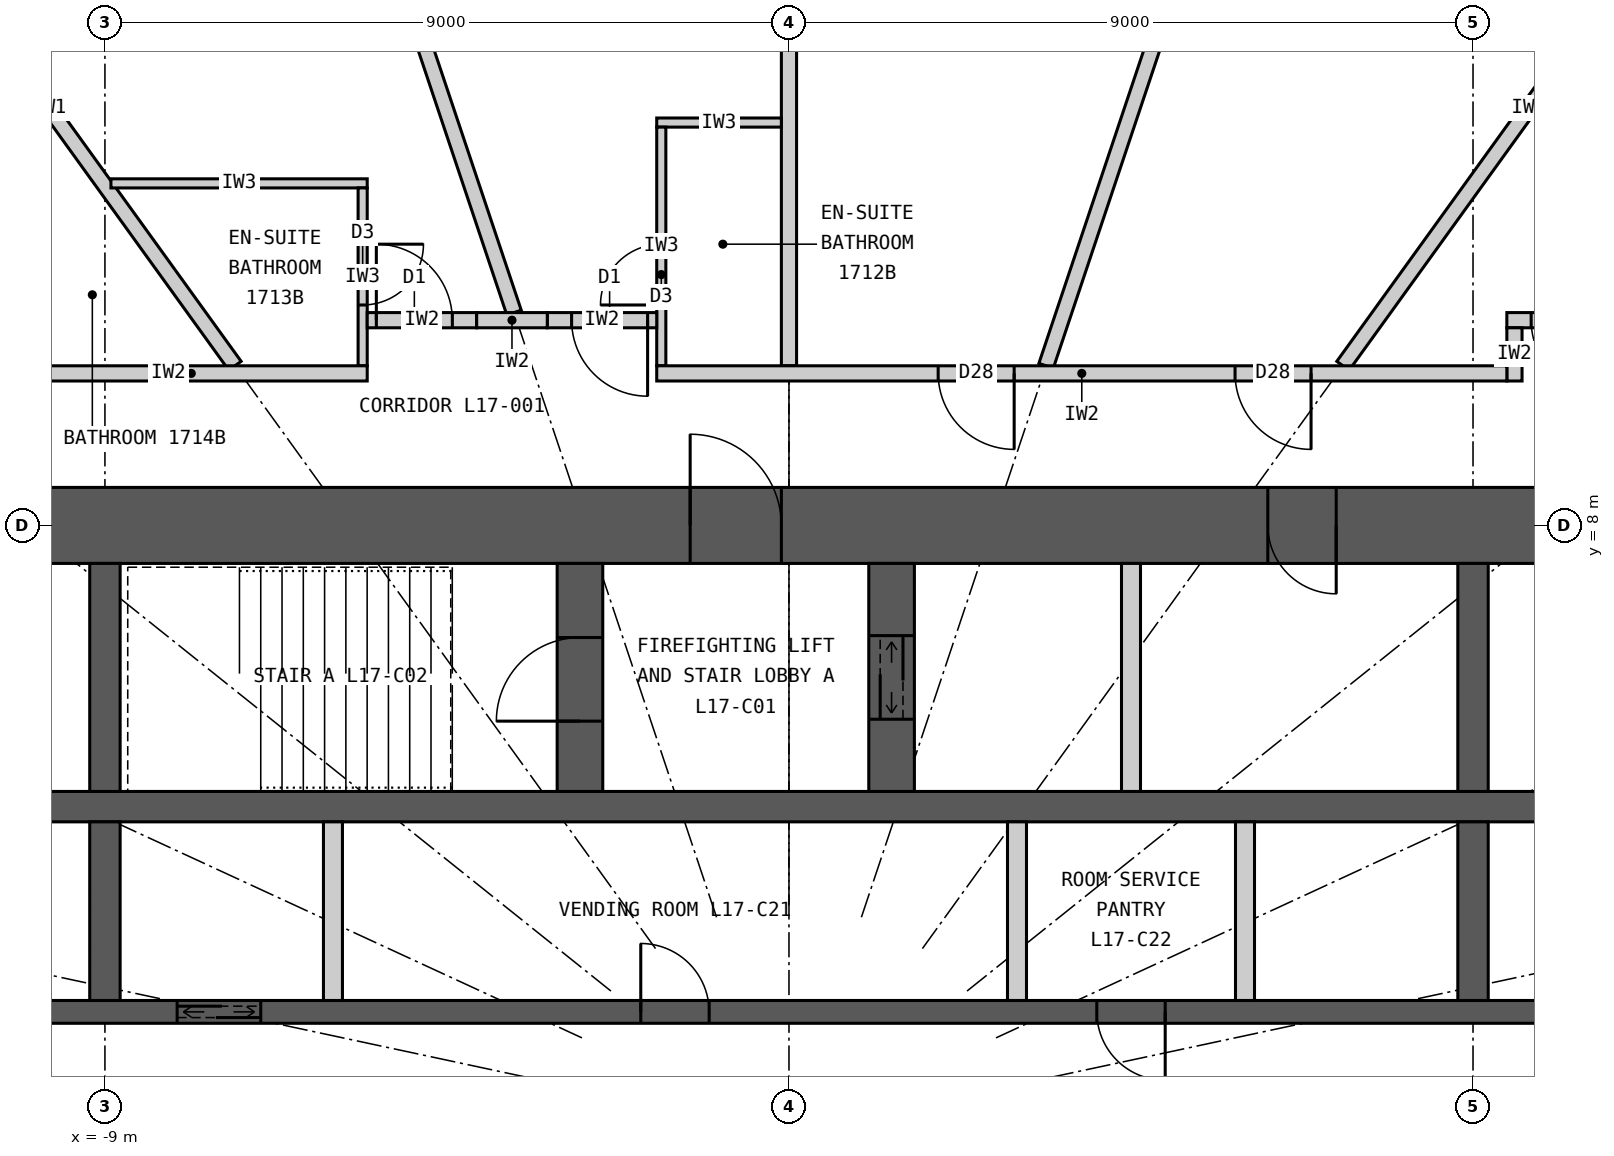
"""IFC4 building model, lengths in metres.
Left out: names, types, materials, properties, quantities, classifications, styles, units other than length and angle.
Written with IfcOpenShell. Run it as: python <this file> out.ifc"""

import sys

from ifc_helpers import new_model, si_unit, direction, frame, frame_2d, origin, place, context, subcontext, project, spatial, rectangle, extrude, element, fill, save


model = new_model("IFC4")
c1 = context("Model", 3, precision=1e-05, world=origin(), true_north=direction((0.0, 1.0)))
c2 = subcontext(c1, "Body", "Model", "MODEL_VIEW")
j1 = project(units=[si_unit("LENGTHUNIT", "METRE"), si_unit("PLANEANGLEUNIT", "RADIAN")], contexts=[c1])
p1 = place(None, origin())
s1 = spatial("IfcSite", under=j1, at=p1, CompositionType="ELEMENT")
p2 = place(p1, origin())
s2 = spatial("IfcBuilding", under=s1, at=p2, CompositionType="ELEMENT")
p3 = place(p2, frame((0.0, 0.0, 70.5)))
s3 = spatial("IfcBuildingStorey", under=s2, at=p3, CompositionType="ELEMENT", Elevation=70.5)
p4 = place(p3, frame((-12.5, 8.0, 0.0), z_axis=(0.0, 0.0, 1.0), x_axis=(1.0, 0.0, 0.0)))
e1 = element("IfcWall", 1, at=p4, inside=s3, PredefinedType="SHEAR", context=c2, shape_type="SweptSolid", body=[
    extrude(rectangle(XDim=25.0, YDim=1.0, at=frame_2d((12.5, 0.0))), origin(), (0.0, 0.0, 1.0), 3.3),
])
p5 = place(p4, frame((11.2, 0.0, 0.0)))
e2 = element("IfcOpeningElement", 2, at=p5, cuts=e1, PredefinedType="OPENING", context=c2, shape_type="SweptSolid", body=[
    extrude(rectangle(XDim=1.2, YDim=2.2, at=frame_2d((0.6, 1.1))), frame((0.0, 0.51, 0.0), z_axis=(0.0, -1.0, 0.0), x_axis=(1.0, 0.0, 0.0)), (0.0, 0.0, 1.0), 1.02),
])
p6 = place(p4, frame((18.8, 0.0, 0.0)))
e3 = element("IfcOpeningElement", 3, at=p6, cuts=e1, PredefinedType="OPENING", context=c2, shape_type="SweptSolid", body=[
    extrude(rectangle(XDim=0.9, YDim=2.2, at=frame_2d((0.45, 1.1))), frame((0.0, 0.51, 0.0), z_axis=(0.0, -1.0, 0.0), x_axis=(1.0, 0.0, 0.0)), (0.0, 0.0, 1.0), 1.02),
])
p7 = place(p3, frame((-11.5, 4.3, 0.0), z_axis=(0.0, 0.0, 1.0), x_axis=(1.0, 0.0, 0.0)))
e4 = element("IfcWall", 4, at=p7, inside=s3, PredefinedType="SHEAR", context=c2, shape_type="SweptSolid", body=[
    extrude(rectangle(XDim=23.0, YDim=0.4, at=frame_2d((11.5, 0.0))), origin(), (0.0, 0.0, 1.0), 3.3),
])
p8 = place(p3, frame((-11.5, 1.6, 0.0), z_axis=(0.0, 0.0, 1.0), x_axis=(1.0, 0.0, 0.0)))
e5 = element("IfcWall", 5, at=p8, inside=s3, PredefinedType="SHEAR", context=c2, shape_type="SweptSolid", body=[
    extrude(rectangle(XDim=23.0, YDim=0.3, at=frame_2d((11.5, 0.0))), origin(), (0.0, 0.0, 1.0), 3.3),
])
p9 = place(p8, frame((0.45, 0.0, 0.0)))
e6 = element("IfcOpeningElement", 6, at=p9, cuts=e5, PredefinedType="OPENING", context=c2, shape_type="SweptSolid", body=[
    extrude(rectangle(XDim=1.1, YDim=2.2, at=frame_2d((0.55, 1.1))), frame((0.0, 0.16, 0.0), z_axis=(0.0, -1.0, 0.0), x_axis=(1.0, 0.0, 0.0)), (0.0, 0.0, 1.0), 0.32),
])
p10 = place(p8, frame((3.45, 0.0, 0.0)))
e7 = element("IfcOpeningElement", 7, at=p10, cuts=e5, PredefinedType="OPENING", context=c2, shape_type="SweptSolid", body=[
    extrude(rectangle(XDim=1.1, YDim=2.2, at=frame_2d((0.55, 1.1))), frame((0.0, 0.16, 0.0), z_axis=(0.0, -1.0, 0.0), x_axis=(1.0, 0.0, 0.0)), (0.0, 0.0, 1.0), 0.32),
])
p11 = place(p8, frame((9.55, 0.0, 0.0)))
e8 = element("IfcOpeningElement", 8, at=p11, cuts=e5, PredefinedType="OPENING", context=c2, shape_type="SweptSolid", body=[
    extrude(rectangle(XDim=0.9, YDim=2.2, at=frame_2d((0.45, 1.1))), frame((0.0, 0.16, 0.0), z_axis=(0.0, -1.0, 0.0), x_axis=(1.0, 0.0, 0.0)), (0.0, 0.0, 1.0), 0.32),
])
p12 = place(p8, frame((15.55, 0.0, 0.0)))
e9 = element("IfcOpeningElement", 9, at=p12, cuts=e5, PredefinedType="OPENING", context=c2, shape_type="SweptSolid", body=[
    extrude(rectangle(XDim=0.9, YDim=2.2, at=frame_2d((0.45, 1.1))), frame((0.0, 0.16, 0.0), z_axis=(0.0, -1.0, 0.0), x_axis=(1.0, 0.0, 0.0)), (0.0, 0.0, 1.0), 0.32),
])
p13 = place(p3, frame((-9.0, 4.5, 0.0), z_axis=(0.0, 0.0, 1.0), x_axis=(0.0, 1.0, 0.0)))
e10 = element("IfcWall", 10, at=p13, inside=s3, PredefinedType="SHEAR", context=c2, shape_type="SweptSolid", body=[
    extrude(rectangle(XDim=3.0, YDim=0.4, at=frame_2d((1.5, 0.0))), origin(), (0.0, 0.0, 1.0), 3.3),
])
p14 = place(p3, frame((-9.0, 1.75, 0.0), z_axis=(0.0, 0.0, 1.0), x_axis=(0.0, 1.0, 0.0)))
e11 = element("IfcWall", 11, at=p14, inside=s3, PredefinedType="SHEAR", context=c2, shape_type="SweptSolid", body=[
    extrude(rectangle(XDim=2.35, YDim=0.4, at=frame_2d((1.175, 0.0))), origin(), (0.0, 0.0, 1.0), 3.3),
])
p15 = place(p3, frame((9.0, 4.5, 0.0), z_axis=(0.0, 0.0, 1.0), x_axis=(0.0, 1.0, 0.0)))
e12 = element("IfcWall", 12, at=p15, inside=s3, PredefinedType="SHEAR", context=c2, shape_type="SweptSolid", body=[
    extrude(rectangle(XDim=3.0, YDim=0.4, at=frame_2d((1.5, 0.0))), origin(), (0.0, 0.0, 1.0), 3.3),
])
p16 = place(p3, frame((9.0, 1.75, 0.0), z_axis=(0.0, 0.0, 1.0), x_axis=(0.0, 1.0, 0.0)))
e13 = element("IfcWall", 13, at=p16, inside=s3, PredefinedType="SHEAR", context=c2, shape_type="SweptSolid", body=[
    extrude(rectangle(XDim=2.35, YDim=0.4, at=frame_2d((1.175, 0.0))), origin(), (0.0, 0.0, 1.0), 3.3),
])
p17 = place(p3, frame((-2.75, 4.5, 0.0), z_axis=(0.0, 0.0, 1.0), x_axis=(0.0, 1.0, 0.0)))
e14 = element("IfcWall", 14, at=p17, inside=s3, PredefinedType="SHEAR", context=c2, shape_type="SweptSolid", body=[
    extrude(rectangle(XDim=3.0, YDim=0.6, at=frame_2d((1.5, 0.0))), origin(), (0.0, 0.0, 1.0), 3.3),
])
p18 = place(p17, frame((0.925, 0.0, 0.0)))
e15 = element("IfcOpeningElement", 15, at=p18, cuts=e14, PredefinedType="OPENING", context=c2, shape_type="SweptSolid", body=[
    extrude(rectangle(XDim=1.1, YDim=2.2, at=frame_2d((0.55, 1.1))), frame((0.0, 0.31, 0.0), z_axis=(0.0, -1.0, 0.0), x_axis=(1.0, 0.0, 0.0)), (0.0, 0.0, 1.0), 0.62),
])
p19 = place(p3, frame((1.35, 4.5, 0.0), z_axis=(0.0, 0.0, 1.0), x_axis=(0.0, 1.0, 0.0)))
e16 = element("IfcWall", 16, at=p19, inside=s3, PredefinedType="SHEAR", context=c2, shape_type="SweptSolid", body=[
    extrude(rectangle(XDim=3.0, YDim=0.6, at=frame_2d((1.5, 0.0))), origin(), (0.0, 0.0, 1.0), 3.3),
])
p20 = place(p19, frame((0.95, 0.0, 0.0)))
e17 = element("IfcOpeningElement", 17, at=p20, cuts=e16, PredefinedType="OPENING", context=c2, shape_type="SweptSolid", body=[
    extrude(rectangle(XDim=1.1, YDim=2.2, at=frame_2d((0.55, 1.1))), frame((0.0, 0.31, 0.0), z_axis=(0.0, -1.0, 0.0), x_axis=(1.0, 0.0, 0.0)), (0.0, 0.0, 1.0), 0.62),
])
p21 = place(p3, frame((4.5, 4.5, 0.0), z_axis=(0.0, 0.0, 1.0), x_axis=(0.0, 1.0, 0.0)))
e18 = element("IfcWall", 18, at=p21, inside=s3, PredefinedType="PARTITIONING", context=c2, shape_type="SweptSolid", body=[
    extrude(rectangle(XDim=3.0, YDim=0.25, at=frame_2d((1.5, 0.0))), origin(), (0.0, 0.0, 1.0), 3.3),
])
for number, where, z_axis, x_axis in (
    (19, (-6.0, 1.75, 0.0), (0.0, 0.0, 1.0), (0.0, 1.0, 0.0)),
    (20, (3.0, 1.75, 0.0), (0.0, 0.0, 1.0), (0.0, 1.0, 0.0)),
    (21, (6.0, 1.75, 0.0), (0.0, 0.0, 1.0), (0.0, 1.0, 0.0)),
):
    element("IfcWall", number, at=place(p3, frame(where, z_axis=z_axis, x_axis=x_axis)), inside=s3, PredefinedType="PARTITIONING", context=c2, shape_type="SweptSolid", body=[
        extrude(rectangle(XDim=2.35, YDim=0.25, at=frame_2d((1.175, 0.0))), origin(), (0.0, 0.0, 1.0), 3.3),
    ])
p22 = place(p3, frame((7.289, 10.1, 0.0), z_axis=(0.0, 0.0, 1.0), x_axis=(0.585198353053, 0.810890182197, 0.0)))
e22 = element("IfcWall", 22, at=p22, inside=s3, PredefinedType="PARTITIONING", context=c2, shape_type="SweptSolid", body=[
    extrude(rectangle(XDim=8.36, YDim=0.2, at=frame_2d((4.18, 0.0))), origin(), (0.0, 0.0, 1.0), 2.32),
])
p23 = place(p3, frame((3.383, 10.1, 0.0), z_axis=(0.0, 0.0, 1.0), x_axis=(0.31759592231, 0.948226149256, 0.0)))
e23 = element("IfcWall", 23, at=p23, inside=s3, PredefinedType="PARTITIONING", context=c2, shape_type="SweptSolid", body=[
    extrude(rectangle(XDim=9.098, YDim=0.2, at=frame_2d((4.549, 0.0))), origin(), (0.0, 0.0, 1.0), 2.32),
])
p24 = place(p3, frame((0.0, 10.1, 0.0), z_axis=(0.0, 0.0, 1.0), x_axis=(0.0, 1.0, 0.0)))
e24 = element("IfcWall", 24, at=p24, inside=s3, PredefinedType="PARTITIONING", context=c2, shape_type="SweptSolid", body=[
    extrude(rectangle(XDim=9.25, YDim=0.2, at=frame_2d((4.625, 0.0))), origin(), (0.0, 0.0, 1.0), 2.32),
])
p25 = place(p3, frame((-3.617, 10.8, 0.0), z_axis=(0.0, 0.0, 1.0), x_axis=(-0.317576599239, 0.948232621046, 0.0)))
e25 = element("IfcWall", 25, at=p25, inside=s3, PredefinedType="PARTITIONING", context=c2, shape_type="SweptSolid", body=[
    extrude(rectangle(XDim=8.36, YDim=0.2, at=frame_2d((4.18, 0.0))), origin(), (0.0, 0.0, 1.0), 2.32),
])
p26 = place(p3, frame((-7.289, 10.1, 0.0), z_axis=(0.0, 0.0, 1.0), x_axis=(-0.585198353053, 0.810890182197, 0.0)))
e26 = element("IfcWall", 26, at=p26, inside=s3, PredefinedType="PARTITIONING", context=c2, shape_type="SweptSolid", body=[
    extrude(rectangle(XDim=8.36, YDim=0.2, at=frame_2d((4.18, 0.0))), origin(), (0.0, 0.0, 1.0), 2.32),
])
p27 = place(p3, frame((-0.1, 13.3, 0.0), z_axis=(0.0, 0.0, 1.0), x_axis=(-1.0, 0.0, 0.0)))
e27 = element("IfcWall", 27, at=p27, inside=s3, PredefinedType="PARTITIONING", context=c2, shape_type="SweptSolid", body=[
    extrude(rectangle(XDim=1.64, YDim=0.12, at=frame_2d((0.82, 0.0))), origin(), (0.0, 0.0, 1.0), 3.12),
])
p28 = place(p3, frame((-1.68, 10.1, 0.0), z_axis=(0.0, 0.0, 1.0), x_axis=(0.0, 1.0, 0.0)))
e28 = element("IfcWall", 28, at=p28, inside=s3, PredefinedType="PARTITIONING", context=c2, shape_type="SweptSolid", body=[
    extrude(rectangle(XDim=3.14, YDim=0.12, at=frame_2d((1.57, 0.0))), origin(), (0.0, 0.0, 1.0), 3.12),
])
p29 = place(p28, frame((0.8, 0.0, 0.0)))
e29 = element("IfcOpeningElement", 29, at=p29, cuts=e28, PredefinedType="OPENING", context=c2, shape_type="SweptSolid", body=[
    extrude(rectangle(XDim=0.8, YDim=2.1, at=frame_2d((0.4, 1.05))), frame((0.0, 0.07, 0.0), z_axis=(0.0, -1.0, 0.0), x_axis=(1.0, 0.0, 0.0)), (0.0, 0.0, 1.0), 0.14),
])
p30 = place(p3, frame((-8.921, 12.5, 0.0), z_axis=(0.0, 0.0, 1.0), x_axis=(1.0, 0.0, 0.0)))
e30 = element("IfcWall", 30, at=p30, inside=s3, PredefinedType="PARTITIONING", context=c2, shape_type="SweptSolid", body=[
    extrude(rectangle(XDim=3.372, YDim=0.12, at=frame_2d((1.686, 0.0))), origin(), (0.0, 0.0, 1.0), 3.12),
])
p31 = place(p3, frame((-5.609, 10.1, 0.0), z_axis=(0.0, 0.0, 1.0), x_axis=(0.0, 1.0, 0.0)))
e31 = element("IfcWall", 31, at=p31, inside=s3, PredefinedType="PARTITIONING", context=c2, shape_type="SweptSolid", body=[
    extrude(rectangle(XDim=2.34, YDim=0.12, at=frame_2d((1.17, 0.0))), origin(), (0.0, 0.0, 1.0), 3.12),
])
p32 = place(p31, frame((0.8, 0.0, 0.0)))
e32 = element("IfcOpeningElement", 32, at=p32, cuts=e31, PredefinedType="OPENING", context=c2, shape_type="SweptSolid", body=[
    extrude(rectangle(XDim=0.8, YDim=2.1, at=frame_2d((0.4, 1.05))), frame((0.0, 0.07, 0.0), z_axis=(0.0, -1.0, 0.0), x_axis=(1.0, 0.0, 0.0)), (0.0, 0.0, 1.0), 0.14),
])
p33 = place(p3, frame((9.445, 10.7, 0.0), z_axis=(0.0, 0.0, 1.0), x_axis=(1.0, 0.0, 0.0)))
e33 = element("IfcWall", 33, at=p33, inside=s3, PredefinedType="PARTITIONING", context=c2, shape_type="SweptSolid", body=[
    extrude(rectangle(XDim=1.44, YDim=0.2, at=frame_2d((0.72, 0.0))), origin(), (0.0, 0.0, 1.0), 3.12),
])
p34 = place(p33, frame((0.32, 0.0, 0.0)))
e34 = element("IfcOpeningElement", 34, at=p34, cuts=e33, PredefinedType="OPENING", context=c2, shape_type="SweptSolid", body=[
    extrude(rectangle(XDim=1.0, YDim=2.2, at=frame_2d((0.5, 1.1))), frame((0.0, 0.11, 0.0), z_axis=(0.0, -1.0, 0.0), x_axis=(1.0, 0.0, 0.0)), (0.0, 0.0, 1.0), 0.22),
])
p35 = place(p3, frame((9.545, 9.9, 0.0), z_axis=(0.0, 0.0, 1.0), x_axis=(0.0, 1.0, 0.0)))
e35 = element("IfcWall", 35, at=p35, inside=s3, PredefinedType="PARTITIONING", context=c2, shape_type="SweptSolid", body=[
    extrude(rectangle(XDim=0.7, YDim=0.2, at=frame_2d((0.35, 0.0))), origin(), (0.0, 0.0, 1.0), 3.12),
])
p36 = place(p3, frame((-3.18, 10.7, 0.0), z_axis=(0.0, 0.0, 1.0), x_axis=(1.0, 0.0, 0.0)))
e36 = element("IfcWall", 36, at=p36, inside=s3, PredefinedType="PARTITIONING", context=c2, shape_type="SweptSolid", body=[
    extrude(rectangle(XDim=1.44, YDim=0.2, at=frame_2d((0.72, 0.0))), origin(), (0.0, 0.0, 1.0), 3.12),
])
p37 = place(p36, frame((0.32, 0.0, 0.0)))
e37 = element("IfcOpeningElement", 37, at=p37, cuts=e36, PredefinedType="OPENING", context=c2, shape_type="SweptSolid", body=[
    extrude(rectangle(XDim=1.0, YDim=2.2, at=frame_2d((0.5, 1.1))), frame((0.0, 0.11, 0.0), z_axis=(0.0, -1.0, 0.0), x_axis=(1.0, 0.0, 0.0)), (0.0, 0.0, 1.0), 0.22),
])
p38 = place(p3, frame((-5.549, 10.7, 0.0), z_axis=(0.0, 0.0, 1.0), x_axis=(1.0, 0.0, 0.0)))
e38 = element("IfcWall", 38, at=p38, inside=s3, PredefinedType="PARTITIONING", context=c2, shape_type="SweptSolid", body=[
    extrude(rectangle(XDim=1.44, YDim=0.2, at=frame_2d((0.72, 0.0))), origin(), (0.0, 0.0, 1.0), 3.12),
])
p39 = place(p38, frame((0.12, 0.0, 0.0)))
e39 = element("IfcOpeningElement", 39, at=p39, cuts=e38, PredefinedType="OPENING", context=c2, shape_type="SweptSolid", body=[
    extrude(rectangle(XDim=1.0, YDim=2.2, at=frame_2d((0.5, 1.1))), frame((0.0, 0.11, 0.0), z_axis=(0.0, -1.0, 0.0), x_axis=(1.0, 0.0, 0.0)), (0.0, 0.0, 1.0), 0.22),
])
p40 = place(p3, frame((-4.109, 10.7, 0.0), z_axis=(0.0, 0.0, 1.0), x_axis=(1.0, 0.0, 0.0)))
e40 = element("IfcWall", 40, at=p40, inside=s3, PredefinedType="PARTITIONING", context=c2, shape_type="SweptSolid", body=[
    extrude(rectangle(XDim=0.929, YDim=0.2, at=frame_2d((0.465, 0.0))), origin(), (0.0, 0.0, 1.0), 3.12),
])
p41 = place(p3, frame((-10.179, 10.0, 0.0), z_axis=(0.0, 0.0, 1.0), x_axis=(1.0, 0.0, 0.0)))
e41 = element("IfcWall", 41, at=p41, inside=s3, PredefinedType="PARTITIONING", context=c2, shape_type="SweptSolid", body=[
    extrude(rectangle(XDim=4.63, YDim=0.2, at=frame_2d((2.315, 0.0))), origin(), (0.0, 0.0, 1.0), 3.12),
])
p42 = place(p3, frame((-1.74, 10.0, 0.0), z_axis=(0.0, 0.0, 1.0), x_axis=(1.0, 0.0, 0.0)))
e42 = element("IfcWall", 42, at=p42, inside=s3, PredefinedType="PARTITIONING", context=c2, shape_type="SweptSolid", body=[
    extrude(rectangle(XDim=11.185, YDim=0.2, at=frame_2d((5.593, 0.0))), origin(), (0.0, 0.0, 1.0), 3.12),
])
p43 = place(p42, frame((7.609, 0.0, 0.0)))
e43 = element("IfcOpeningElement", 43, at=p43, cuts=e42, PredefinedType="OPENING", context=c2, shape_type="SweptSolid", body=[
    extrude(rectangle(XDim=1.0, YDim=2.2, at=frame_2d((0.5, 1.1))), frame((0.0, 0.11, 0.0), z_axis=(0.0, -1.0, 0.0), x_axis=(1.0, 0.0, 0.0)), (0.0, 0.0, 1.0), 0.22),
])
p44 = place(p42, frame((3.703, 0.0, 0.0)))
e44 = element("IfcOpeningElement", 44, at=p44, cuts=e42, PredefinedType="OPENING", context=c2, shape_type="SweptSolid", body=[
    extrude(rectangle(XDim=1.0, YDim=2.2, at=frame_2d((0.5, 1.1))), frame((0.0, 0.11, 0.0), z_axis=(0.0, -1.0, 0.0), x_axis=(1.0, 0.0, 0.0)), (0.0, 0.0, 1.0), 0.22),
])
p45 = place(p34, origin())
e45 = element("IfcDoor", 45, at=p45, inside=s3, OperationType="SINGLE_SWING_RIGHT", PredefinedType="DOOR", context=c2, shape_type="SweptSolid", body=[
    extrude(rectangle(XDim=1.0, YDim=2.2, at=frame_2d((0.5, 1.1))), frame((0.0, 0.025, 0.0), z_axis=(0.0, -1.0, 0.0), x_axis=(1.0, 0.0, 0.0)), (0.0, 0.0, 1.0), 0.05),
])
fill(e34, e45)
p46 = place(p43, origin())
e46 = element("IfcDoor", 46, at=p46, inside=s3, OperationType="SINGLE_SWING_RIGHT", PredefinedType="DOOR", context=c2, shape_type="SweptSolid", body=[
    extrude(rectangle(XDim=1.0, YDim=2.2, at=frame_2d((0.5, 1.1))), frame((0.0, 0.025, 0.0), z_axis=(0.0, -1.0, 0.0), x_axis=(1.0, 0.0, 0.0)), (0.0, 0.0, 1.0), 0.05),
])
fill(e43, e46)
p47 = place(p44, origin())
e47 = element("IfcDoor", 47, at=p47, inside=s3, OperationType="SINGLE_SWING_RIGHT", PredefinedType="DOOR", context=c2, shape_type="SweptSolid", body=[
    extrude(rectangle(XDim=1.0, YDim=2.2, at=frame_2d((0.5, 1.1))), frame((0.0, 0.025, 0.0), z_axis=(0.0, -1.0, 0.0), x_axis=(1.0, 0.0, 0.0)), (0.0, 0.0, 1.0), 0.05),
])
fill(e44, e47)
p48 = place(p29, origin())
e48 = element("IfcDoor", 48, at=p48, inside=s3, OperationType="SINGLE_SWING_LEFT", PredefinedType="DOOR", context=c2, shape_type="SweptSolid", body=[
    extrude(rectangle(XDim=0.8, YDim=2.1, at=frame_2d((0.4, 1.05))), frame((0.0, 0.025, 0.0), z_axis=(0.0, -1.0, 0.0), x_axis=(1.0, 0.0, 0.0)), (0.0, 0.0, 1.0), 0.05),
])
fill(e29, e48)
p49 = place(p37, origin())
e49 = element("IfcDoor", 49, at=p49, inside=s3, OperationType="SINGLE_SWING_RIGHT", PredefinedType="DOOR", context=c2, shape_type="SweptSolid", body=[
    extrude(rectangle(XDim=1.0, YDim=2.2, at=frame_2d((0.5, 1.1))), frame((0.0, 0.025, 0.0), z_axis=(0.0, -1.0, 0.0), x_axis=(1.0, 0.0, 0.0)), (0.0, 0.0, 1.0), 0.05),
])
fill(e37, e49)
p50 = place(p32, origin())
e50 = element("IfcDoor", 50, at=p50, inside=s3, OperationType="SINGLE_SWING_RIGHT", PredefinedType="DOOR", context=c2, shape_type="SweptSolid", body=[
    extrude(rectangle(XDim=0.8, YDim=2.1, at=frame_2d((0.4, 1.05))), frame((0.0, 0.025, 0.0), z_axis=(0.0, -1.0, 0.0), x_axis=(1.0, 0.0, 0.0)), (0.0, 0.0, 1.0), 0.05),
])
fill(e32, e50)
p51 = place(p39, origin())
e51 = element("IfcDoor", 51, at=p51, inside=s3, OperationType="SINGLE_SWING_LEFT", PredefinedType="DOOR", context=c2, shape_type="SweptSolid", body=[
    extrude(rectangle(XDim=1.0, YDim=2.2, at=frame_2d((0.5, 1.1))), frame((0.0, 0.025, 0.0), z_axis=(0.0, -1.0, 0.0), x_axis=(1.0, 0.0, 0.0)), (0.0, 0.0, 1.0), 0.05),
])
fill(e39, e51)
p52 = place(p5, origin())
e52 = element("IfcDoor", 52, at=p52, inside=s3, OperationType="SINGLE_SWING_LEFT", PredefinedType="DOOR", context=c2, shape_type="SweptSolid", body=[
    extrude(rectangle(XDim=1.2, YDim=2.2, at=frame_2d((0.6, 1.1))), frame((0.0, 0.025, 0.0), z_axis=(0.0, -1.0, 0.0), x_axis=(1.0, 0.0, 0.0)), (0.0, 0.0, 1.0), 0.05),
])
fill(e2, e52)
p53 = place(p18, origin())
e53 = element("IfcDoor", 53, at=p53, inside=s3, OperationType="SINGLE_SWING_LEFT", PredefinedType="DOOR", context=c2, shape_type="SweptSolid", body=[
    extrude(rectangle(XDim=1.1, YDim=2.2, at=frame_2d((0.55, 1.1))), frame((0.0, 0.025, 0.0), z_axis=(0.0, -1.0, 0.0), x_axis=(1.0, 0.0, 0.0)), (0.0, 0.0, 1.0), 0.05),
])
fill(e15, e53)
p54 = place(p20, origin())
e54 = element("IfcDoor", 54, at=p54, inside=s3, OperationType="DOUBLE_DOOR_SLIDING", PredefinedType="DOOR", context=c2, shape_type="SweptSolid", body=[
    extrude(rectangle(XDim=1.1, YDim=2.2, at=frame_2d((0.55, 1.1))), frame((0.0, 0.025, 0.0), z_axis=(0.0, -1.0, 0.0), x_axis=(1.0, 0.0, 0.0)), (0.0, 0.0, 1.0), 0.05),
])
fill(e17, e54)
p55 = place(p6, origin())
e55 = element("IfcDoor", 55, at=p55, inside=s3, OperationType="SINGLE_SWING_RIGHT", PredefinedType="DOOR", context=c2, shape_type="SweptSolid", body=[
    extrude(rectangle(XDim=0.9, YDim=2.2, at=frame_2d((0.45, 1.1))), frame((0.0, 0.025, 0.0), z_axis=(0.0, -1.0, 0.0), x_axis=(1.0, 0.0, 0.0)), (0.0, 0.0, 1.0), 0.05),
])
fill(e3, e55)
p56 = place(p10, origin())
e56 = element("IfcDoor", 56, at=p56, inside=s3, OperationType="DOUBLE_DOOR_SLIDING", PredefinedType="DOOR", context=c2, shape_type="SweptSolid", body=[
    extrude(rectangle(XDim=1.1, YDim=2.2, at=frame_2d((0.55, 1.1))), frame((0.0, 0.025, 0.0), z_axis=(0.0, -1.0, 0.0), x_axis=(1.0, 0.0, 0.0)), (0.0, 0.0, 1.0), 0.05),
])
fill(e7, e56)
p57 = place(p11, origin())
e57 = element("IfcDoor", 57, at=p57, inside=s3, OperationType="SINGLE_SWING_LEFT", PredefinedType="DOOR", context=c2, shape_type="SweptSolid", body=[
    extrude(rectangle(XDim=0.9, YDim=2.2, at=frame_2d((0.45, 1.1))), frame((0.0, 0.025, 0.0), z_axis=(0.0, -1.0, 0.0), x_axis=(1.0, 0.0, 0.0)), (0.0, 0.0, 1.0), 0.05),
])
fill(e8, e57)
p58 = place(p12, origin())
e58 = element("IfcDoor", 58, at=p58, inside=s3, OperationType="SINGLE_SWING_RIGHT", PredefinedType="DOOR", context=c2, shape_type="SweptSolid", body=[
    extrude(rectangle(XDim=0.9, YDim=2.2, at=frame_2d((0.45, 1.1))), frame((0.0, 0.025, 0.0), z_axis=(0.0, -1.0, 0.0), x_axis=(1.0, 0.0, 0.0)), (0.0, 0.0, 1.0), 0.05),
])
fill(e9, e58)
save(model, sys.argv[1])
